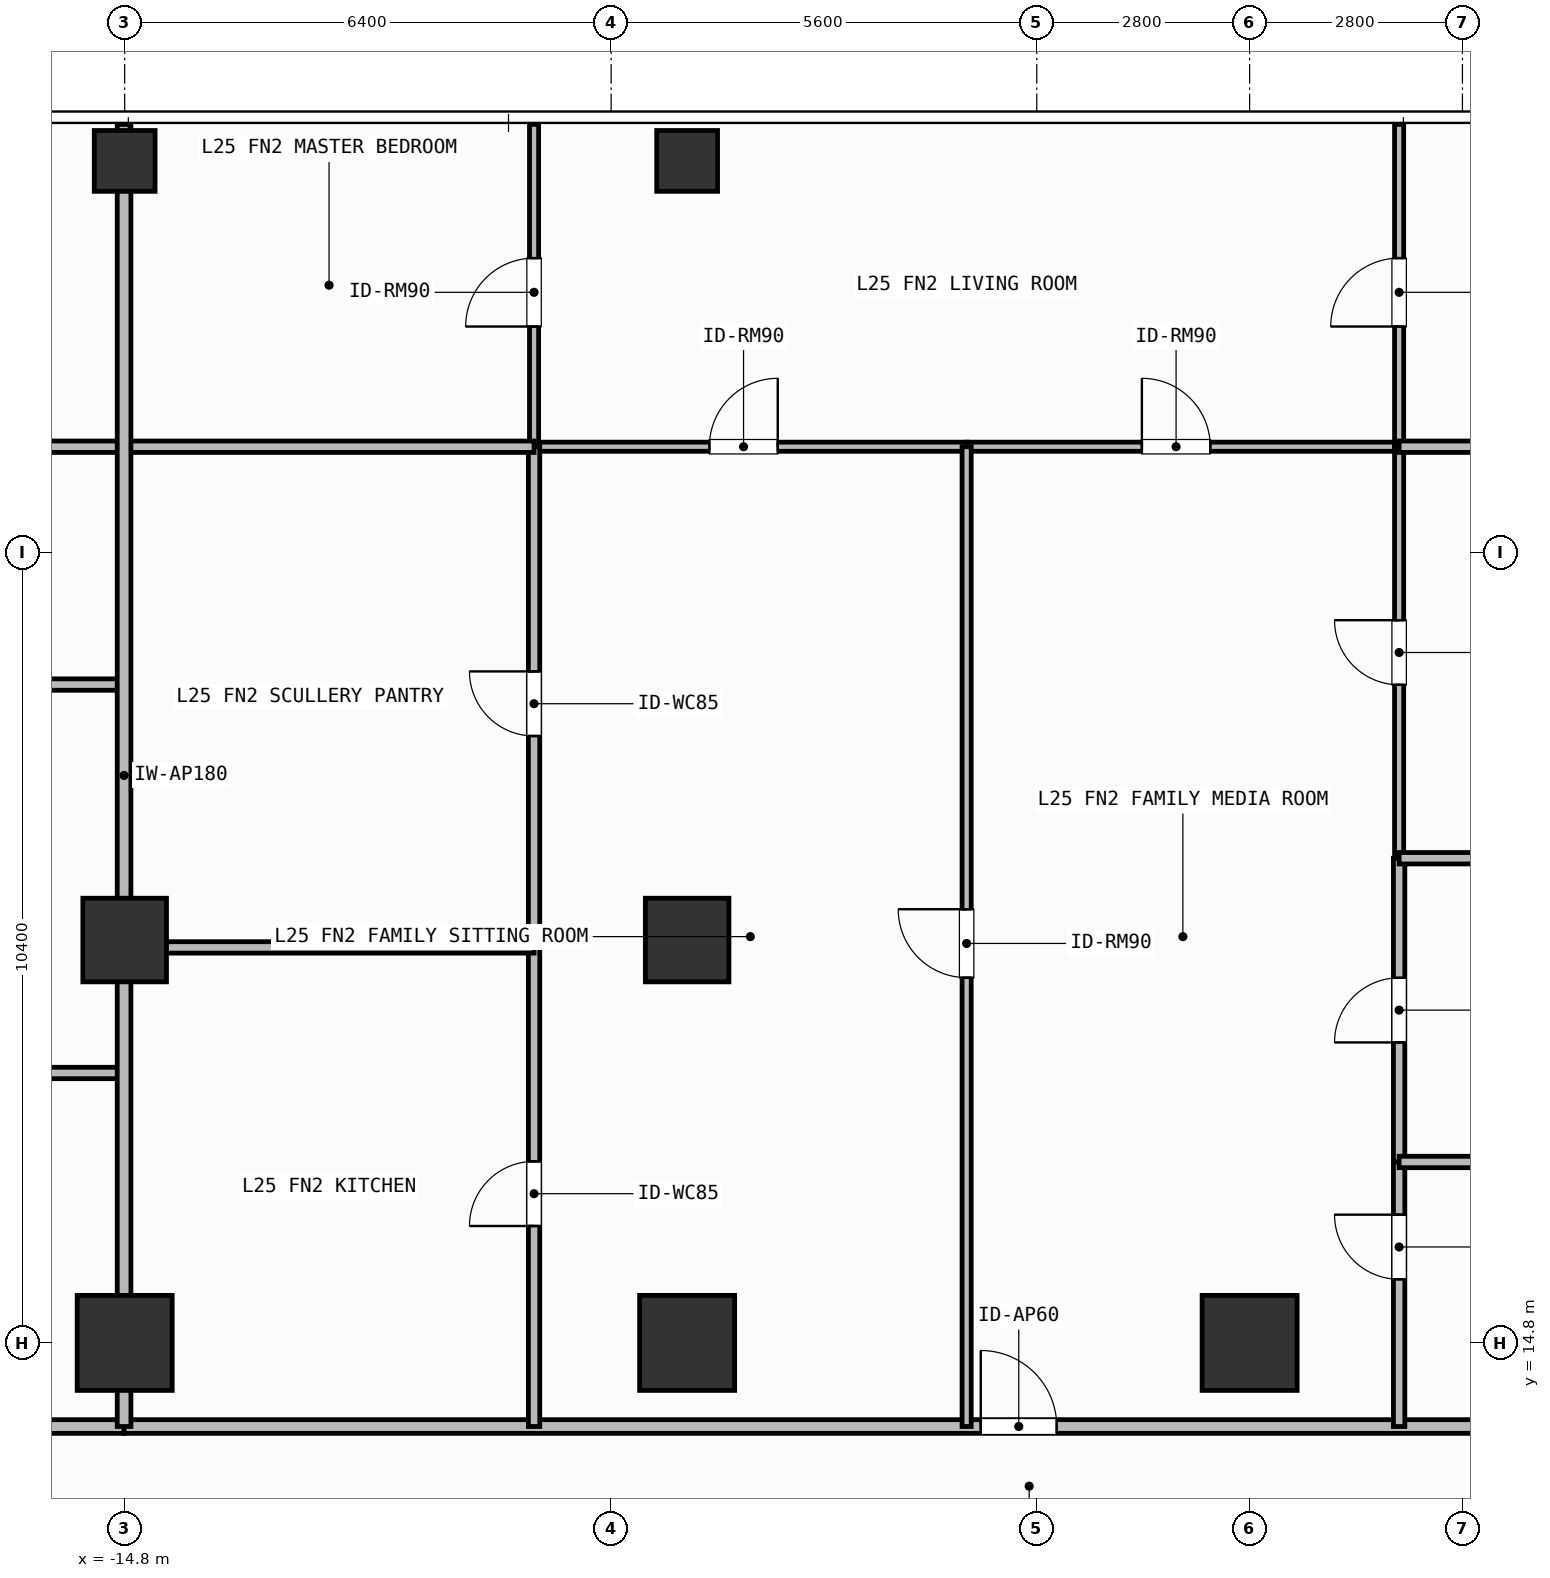
"""IFC4 building model, lengths in metres.
Left out: names, types, materials, properties, quantities, classifications, styles, units other than length and angle.
Written with IfcOpenShell. Run it as: python <this file> out.ifc"""

import sys

from ifc_helpers import new_model, si_unit, direction, frame, frame_2d, origin, origin_2d, place, context, subcontext, project, spatial, rectangle, hollow_rectangle, extrude, element, fill, save


model = new_model("IFC4")
c1 = context("Model", 3, precision=1e-05, world=origin(), true_north=direction((0.0, 1.0)))
c2 = subcontext(c1, "Body", "Model", "MODEL_VIEW")
j1 = project(units=[si_unit("LENGTHUNIT", "METRE"), si_unit("PLANEANGLEUNIT", "RADIAN")], contexts=[c1])
p1 = place(None, origin())
s1 = spatial("IfcSite", under=j1, at=p1, CompositionType="ELEMENT")
p2 = place(p1, origin())
s2 = spatial("IfcBuilding", under=s1, at=p2, CompositionType="ELEMENT")
p3 = place(p2, frame((0.0, 0.0, 100.8)))
s3 = spatial("IfcBuildingStorey", under=s2, at=p3, CompositionType="ELEMENT", Elevation=100.8)
for number, where, z_axis, x_axis in (
    (1, (-14.8, 14.8, 0.0), (0.0, 0.0, 1.0), (1.0, 0.0, 0.0)),
    (2, (-7.4, 14.8, 0.0), (0.0, 0.0, 1.0), (1.0, 0.0, 0.0)),
    (3, (0.0, 14.8, 0.0), (0.0, 0.0, 1.0), (1.0, 0.0, 0.0)),
):
    element("IfcColumn", number, at=place(p3, frame(where, z_axis=z_axis, x_axis=x_axis)), inside=s3, PredefinedType="COLUMN", context=c2, shape_type="SweptSolid", body=[
        extrude(rectangle(XDim=1.25, YDim=1.25, at=origin_2d()), origin(), (0.0, 0.0, 1.0), 3.9),
    ])
for number, where, z_axis, x_axis in (
    (4, (-14.8, 20.1, 0.0), (0.0, 0.0, 1.0), (1.0, 0.0, 0.0)),
    (5, (-7.4, 20.1, 0.0), (0.0, 0.0, 1.0), (1.0, 0.0, 0.0)),
):
    element("IfcColumn", number, at=place(p3, frame(where, z_axis=z_axis, x_axis=x_axis)), inside=s3, PredefinedType="COLUMN", context=c2, shape_type="SweptSolid", body=[
        extrude(rectangle(XDim=1.1, YDim=1.1, at=origin_2d()), origin(), (0.0, 0.0, 1.0), 3.9),
    ])
for number, where, z_axis, x_axis in (
    (6, (-14.8, 30.35, 0.0), (0.0, 0.0, 1.0), (1.0, 0.0, 0.0)),
    (7, (-7.4, 30.35, 0.0), (0.0, 0.0, 1.0), (1.0, 0.0, 0.0)),
):
    element("IfcColumn", number, at=place(p3, frame(where, z_axis=z_axis, x_axis=x_axis)), inside=s3, PredefinedType="COLUMN", context=c2, shape_type="SweptSolid", body=[
        extrude(hollow_rectangle(XDim=0.8, YDim=0.8, WallThickness=0.036, at=origin_2d()), origin(), (0.0, 0.0, 1.0), 3.9),
    ])
p4 = place(p3, frame((-24.42, 13.7, 0.0), z_axis=(0.0, 0.0, 1.0), x_axis=(1.0, 0.0, 0.0)))
e8 = element("IfcWall", 8, at=p4, inside=s3, PredefinedType="PARTITIONING", context=c2, shape_type="SweptSolid", body=[
    extrude(rectangle(XDim=9.612, YDim=0.18, at=frame_2d((4.806, 0.0))), origin(), (0.0, 0.0, 1.0), 3.68),
])
p5 = place(p4, frame((1.748, 0.0, 0.0)))
e9 = element("IfcOpeningElement", 9, at=p5, cuts=e8, PredefinedType="OPENING", context=c2, shape_type="SweptSolid", body=[
    extrude(rectangle(XDim=1.0, YDim=2.2, at=frame_2d((0.5, 1.1))), frame((0.0, 0.1, 0.0), z_axis=(0.0, -1.0, 0.0), x_axis=(1.0, 0.0, 0.0)), (0.0, 0.0, 1.0), 0.2),
])
p6 = place(p3, frame((-14.808, 13.7, 0.0), z_axis=(0.0, 0.0, 1.0), x_axis=(1.0, 0.0, 0.0)))
e10 = element("IfcWall", 10, at=p6, inside=s3, PredefinedType="PARTITIONING", context=c2, shape_type="SweptSolid", body=[
    extrude(rectangle(XDim=21.212, YDim=0.18, at=frame_2d((10.606, 0.0))), origin(), (0.0, 0.0, 1.0), 3.68),
])
p7 = place(p6, frame((11.271, 0.0, 0.0)))
e11 = element("IfcOpeningElement", 11, at=p7, cuts=e10, PredefinedType="OPENING", context=c2, shape_type="SweptSolid", body=[
    extrude(rectangle(XDim=1.0, YDim=2.2, at=frame_2d((0.5, 1.1))), frame((0.0, 0.1, 0.0), z_axis=(0.0, -1.0, 0.0), x_axis=(1.0, 0.0, 0.0)), (0.0, 0.0, 1.0), 0.2),
])
p8 = place(p3, frame((-9.414, 26.59, 0.0), z_axis=(0.0, 0.0, 1.0), x_axis=(1.0, 0.0, 0.0)))
e12 = element("IfcWall", 12, at=p8, inside=s3, PredefinedType="PARTITIONING", context=c2, shape_type="SweptSolid", body=[
    extrude(rectangle(XDim=5.691, YDim=0.12, at=frame_2d((2.846, 0.0))), origin(), (0.0, 0.0, 1.0), 3.68),
])
p9 = place(p8, frame((2.306, 0.0, 0.0)))
e13 = element("IfcOpeningElement", 13, at=p9, cuts=e12, PredefinedType="OPENING", context=c2, shape_type="SweptSolid", body=[
    extrude(rectangle(XDim=0.9, YDim=2.1, at=frame_2d((0.45, 1.05))), frame((0.0, 0.07, 0.0), z_axis=(0.0, -1.0, 0.0), x_axis=(1.0, 0.0, 0.0)), (0.0, 0.0, 1.0), 0.14),
])
p10 = place(p3, frame((-3.723, 26.59, 0.0), z_axis=(0.0, 0.0, 1.0), x_axis=(1.0, 0.0, 0.0)))
e14 = element("IfcWall", 14, at=p10, inside=s3, PredefinedType="PARTITIONING", context=c2, shape_type="SweptSolid", body=[
    extrude(rectangle(XDim=5.69, YDim=0.12, at=frame_2d((2.845, 0.0))), origin(), (0.0, 0.0, 1.0), 3.68),
])
p11 = place(p10, frame((2.306, 0.0, 0.0)))
e15 = element("IfcOpeningElement", 15, at=p11, cuts=e14, PredefinedType="OPENING", context=c2, shape_type="SweptSolid", body=[
    extrude(rectangle(XDim=0.9, YDim=2.1, at=frame_2d((0.45, 1.05))), frame((0.0, 0.07, 0.0), z_axis=(0.0, -1.0, 0.0), x_axis=(1.0, 0.0, 0.0)), (0.0, 0.0, 1.0), 0.14),
])
p12 = place(p3, frame((-3.723, 13.7, 0.0), z_axis=(0.0, 0.0, 1.0), x_axis=(0.0, 1.0, 0.0)))
e16 = element("IfcWall", 16, at=p12, inside=s3, PredefinedType="PARTITIONING", context=c2, shape_type="SweptSolid", body=[
    extrude(rectangle(XDim=12.89, YDim=0.12, at=frame_2d((6.445, 0.0))), origin(), (0.0, 0.0, 1.0), 3.68),
])
p13 = place(p12, frame((5.905, 0.0, 0.0)))
e17 = element("IfcOpeningElement", 17, at=p13, cuts=e16, PredefinedType="OPENING", context=c2, shape_type="SweptSolid", body=[
    extrude(rectangle(XDim=0.9, YDim=2.1, at=frame_2d((0.45, 1.05))), frame((0.0, 0.07, 0.0), z_axis=(0.0, -1.0, 0.0), x_axis=(1.0, 0.0, 0.0)), (0.0, 0.0, 1.0), 0.14),
])
p14 = place(p3, frame((-9.414, 13.7, 0.0), z_axis=(0.0, 0.0, 1.0), x_axis=(0.0, 1.0, 0.0)))
e18 = element("IfcWall", 18, at=p14, inside=s3, PredefinedType="PARTITIONING", context=c2, shape_type="SweptSolid", body=[
    extrude(rectangle(XDim=6.303, YDim=0.15, at=frame_2d((3.151, 0.0))), origin(), (0.0, 0.0, 1.0), 3.68),
])
p15 = place(p14, frame((2.638, 0.0, 0.0)))
e19 = element("IfcOpeningElement", 19, at=p15, cuts=e18, PredefinedType="OPENING", context=c2, shape_type="SweptSolid", body=[
    extrude(rectangle(XDim=0.85, YDim=2.1, at=frame_2d((0.425, 1.05))), frame((0.0, 0.085, 0.0), z_axis=(0.0, -1.0, 0.0), x_axis=(1.0, 0.0, 0.0)), (0.0, 0.0, 1.0), 0.17),
])
p16 = place(p3, frame((-9.414, 20.003, 0.0), z_axis=(0.0, 0.0, 1.0), x_axis=(0.0, 1.0, 0.0)))
e20 = element("IfcWall", 20, at=p16, inside=s3, PredefinedType="PARTITIONING", context=c2, shape_type="SweptSolid", body=[
    extrude(rectangle(XDim=6.587, YDim=0.15, at=frame_2d((3.293, 0.0))), origin(), (0.0, 0.0, 1.0), 3.68),
])
p17 = place(p16, frame((2.781, 0.0, 0.0)))
e21 = element("IfcOpeningElement", 21, at=p17, cuts=e20, PredefinedType="OPENING", context=c2, shape_type="SweptSolid", body=[
    extrude(rectangle(XDim=0.85, YDim=2.1, at=frame_2d((0.425, 1.05))), frame((0.0, 0.085, 0.0), z_axis=(0.0, -1.0, 0.0), x_axis=(1.0, 0.0, 0.0)), (0.0, 0.0, 1.0), 0.17),
])
p18 = place(p3, frame((-9.414, 26.59, 0.0), z_axis=(0.0, 0.0, 1.0), x_axis=(0.0, 1.0, 0.0)))
e22 = element("IfcWall", 22, at=p18, inside=s3, PredefinedType="PARTITIONING", context=c2, shape_type="SweptSolid", body=[
    extrude(rectangle(XDim=4.24, YDim=0.12, at=frame_2d((2.12, 0.0))), origin(), (0.0, 0.0, 1.0), 3.68),
])
p19 = place(p18, frame((1.581, 0.0, 0.0)))
e23 = element("IfcOpeningElement", 23, at=p19, cuts=e22, PredefinedType="OPENING", context=c2, shape_type="SweptSolid", body=[
    extrude(rectangle(XDim=0.9, YDim=2.1, at=frame_2d((0.45, 1.05))), frame((0.0, 0.07, 0.0), z_axis=(0.0, -1.0, 0.0), x_axis=(1.0, 0.0, 0.0)), (0.0, 0.0, 1.0), 0.14),
])
p20 = place(p3, frame((1.967, 13.7, 0.0), z_axis=(0.0, 0.0, 1.0), x_axis=(0.0, 1.0, 0.0)))
e24 = element("IfcWall", 24, at=p20, inside=s3, PredefinedType="PARTITIONING", context=c2, shape_type="SweptSolid", body=[
    extrude(rectangle(XDim=3.48, YDim=0.15, at=frame_2d((1.74, 0.0))), origin(), (0.0, 0.0, 1.0), 3.68),
])
p21 = place(p20, frame((1.937, 0.0, 0.0)))
e25 = element("IfcOpeningElement", 25, at=p21, cuts=e24, PredefinedType="OPENING", context=c2, shape_type="SweptSolid", body=[
    extrude(rectangle(XDim=0.85, YDim=2.1, at=frame_2d((0.425, 1.05))), frame((0.0, 0.085, 0.0), z_axis=(0.0, -1.0, 0.0), x_axis=(1.0, 0.0, 0.0)), (0.0, 0.0, 1.0), 0.17),
])
p22 = place(p3, frame((1.967, 17.18, 0.0), z_axis=(0.0, 0.0, 1.0), x_axis=(0.0, 1.0, 0.0)))
e26 = element("IfcWall", 26, at=p22, inside=s3, PredefinedType="PARTITIONING", context=c2, shape_type="SweptSolid", body=[
    extrude(rectangle(XDim=3.996, YDim=0.15, at=frame_2d((1.998, 0.0))), origin(), (0.0, 0.0, 1.0), 3.68),
])
p23 = place(p22, frame((1.573, 0.0, 0.0)))
e27 = element("IfcOpeningElement", 27, at=p23, cuts=e26, PredefinedType="OPENING", context=c2, shape_type="SweptSolid", body=[
    extrude(rectangle(XDim=0.85, YDim=2.1, at=frame_2d((0.425, 1.05))), frame((0.0, 0.085, 0.0), z_axis=(0.0, -1.0, 0.0), x_axis=(1.0, 0.0, 0.0)), (0.0, 0.0, 1.0), 0.17),
])
p24 = place(p3, frame((1.967, 21.176, 0.0), z_axis=(0.0, 0.0, 1.0), x_axis=(0.0, 1.0, 0.0)))
e28 = element("IfcWall", 28, at=p24, inside=s3, PredefinedType="PARTITIONING", context=c2, shape_type="SweptSolid", body=[
    extrude(rectangle(XDim=5.414, YDim=0.12, at=frame_2d((2.707, 0.0))), origin(), (0.0, 0.0, 1.0), 3.68),
])
p25 = place(p24, frame((2.282, 0.0, 0.0)))
e29 = element("IfcOpeningElement", 29, at=p25, cuts=e28, PredefinedType="OPENING", context=c2, shape_type="SweptSolid", body=[
    extrude(rectangle(XDim=0.85, YDim=2.1, at=frame_2d((0.425, 1.05))), frame((0.0, 0.07, 0.0), z_axis=(0.0, -1.0, 0.0), x_axis=(1.0, 0.0, 0.0)), (0.0, 0.0, 1.0), 0.14),
])
p26 = place(p3, frame((1.967, 26.59, 0.0), z_axis=(0.0, 0.0, 1.0), x_axis=(0.0, 1.0, 0.0)))
e30 = element("IfcWall", 30, at=p26, inside=s3, PredefinedType="PARTITIONING", context=c2, shape_type="SweptSolid", body=[
    extrude(rectangle(XDim=4.24, YDim=0.12, at=frame_2d((2.12, 0.0))), origin(), (0.0, 0.0, 1.0), 3.68),
])
p27 = place(p26, frame((1.581, 0.0, 0.0)))
e31 = element("IfcOpeningElement", 31, at=p27, cuts=e30, PredefinedType="OPENING", context=c2, shape_type="SweptSolid", body=[
    extrude(rectangle(XDim=0.9, YDim=2.1, at=frame_2d((0.45, 1.05))), frame((0.0, 0.07, 0.0), z_axis=(0.0, -1.0, 0.0), x_axis=(1.0, 0.0, 0.0)), (0.0, 0.0, 1.0), 0.14),
])
for number, where, z_axis, x_axis in (
    (32, (-20.721, 18.351, 0.0), (0.0, 0.0, 1.0), (1.0, 0.0, 0.0)),
    (33, (-20.721, 23.461, 0.0), (0.0, 0.0, 1.0), (1.0, 0.0, 0.0)),
    (34, (-20.721, 26.59, 0.0), (0.0, 0.0, 1.0), (1.0, 0.0, 0.0)),
):
    element("IfcWall", number, at=place(p3, frame(where, z_axis=z_axis, x_axis=x_axis)), inside=s3, PredefinedType="PARTITIONING", context=c2, shape_type="SweptSolid", body=[
        extrude(rectangle(XDim=5.913, YDim=0.15, at=frame_2d((2.957, 0.0))), origin(), (0.0, 0.0, 1.0), 3.68),
    ])
p28 = place(p3, frame((-14.808, 20.003, 0.0), z_axis=(0.0, 0.0, 1.0), x_axis=(1.0, 0.0, 0.0)))
e35 = element("IfcWall", 35, at=p28, inside=s3, PredefinedType="PARTITIONING", context=c2, shape_type="SweptSolid", body=[
    extrude(rectangle(XDim=5.394, YDim=0.15, at=frame_2d((2.697, 0.0))), origin(), (0.0, 0.0, 1.0), 3.082),
])
p29 = place(p3, frame((-14.808, 26.59, 0.0), z_axis=(0.0, 0.0, 1.0), x_axis=(1.0, 0.0, 0.0)))
e36 = element("IfcWall", 36, at=p29, inside=s3, PredefinedType="PARTITIONING", context=c2, shape_type="SweptSolid", body=[
    extrude(rectangle(XDim=5.394, YDim=0.15, at=frame_2d((2.697, 0.0))), origin(), (0.0, 0.0, 1.0), 3.68),
])
for number, where, z_axis, x_axis in (
    (37, (1.967, 17.18, 0.0), (0.0, 0.0, 1.0), (1.0, 0.0, 0.0)),
    (38, (1.967, 21.176, 0.0), (0.0, 0.0, 1.0), (1.0, 0.0, 0.0)),
    (39, (1.967, 26.59, 0.0), (0.0, 0.0, 1.0), (1.0, 0.0, 0.0)),
):
    element("IfcWall", number, at=place(p3, frame(where, z_axis=z_axis, x_axis=x_axis)), inside=s3, PredefinedType="PARTITIONING", context=c2, shape_type="SweptSolid", body=[
        extrude(rectangle(XDim=4.437, YDim=0.15, at=frame_2d((2.219, 0.0))), origin(), (0.0, 0.0, 1.0), 3.68),
    ])
p30 = place(p3, frame((-14.808, 13.7, 0.0), z_axis=(0.0, 0.0, 1.0), x_axis=(0.0, 1.0, 0.0)))
e40 = element("IfcWall", 40, at=p30, inside=s3, PredefinedType="PARTITIONING", context=c2, shape_type="SweptSolid", body=[
    extrude(rectangle(XDim=17.13, YDim=0.18, at=frame_2d((8.565, 0.0))), origin(), (0.0, 0.0, 1.0), 3.082),
])
p31 = place(p7, origin())
e41 = element("IfcDoor", 41, at=p31, inside=s3, OperationType="SINGLE_SWING_LEFT", PredefinedType="DOOR", context=c2, shape_type="SweptSolid", body=[
    extrude(rectangle(XDim=1.0, YDim=2.2, at=frame_2d((0.5, 1.1))), frame((0.0, 0.025, 0.0), z_axis=(0.0, -1.0, 0.0), x_axis=(1.0, 0.0, 0.0)), (0.0, 0.0, 1.0), 0.05),
])
fill(e11, e41)
p32 = place(p9, origin())
e42 = element("IfcDoor", 42, at=p32, inside=s3, OperationType="SINGLE_SWING_RIGHT", PredefinedType="DOOR", context=c2, shape_type="SweptSolid", body=[
    extrude(rectangle(XDim=0.9, YDim=2.1, at=frame_2d((0.45, 1.05))), frame((0.0, 0.025, 0.0), z_axis=(0.0, -1.0, 0.0), x_axis=(1.0, 0.0, 0.0)), (0.0, 0.0, 1.0), 0.05),
])
fill(e13, e42)
p33 = place(p11, origin())
e43 = element("IfcDoor", 43, at=p33, inside=s3, OperationType="SINGLE_SWING_LEFT", PredefinedType="DOOR", context=c2, shape_type="SweptSolid", body=[
    extrude(rectangle(XDim=0.9, YDim=2.1, at=frame_2d((0.45, 1.05))), frame((0.0, 0.025, 0.0), z_axis=(0.0, -1.0, 0.0), x_axis=(1.0, 0.0, 0.0)), (0.0, 0.0, 1.0), 0.05),
])
fill(e15, e43)
p34 = place(p13, origin())
e44 = element("IfcDoor", 44, at=p34, inside=s3, OperationType="SINGLE_SWING_RIGHT", PredefinedType="DOOR", context=c2, shape_type="SweptSolid", body=[
    extrude(rectangle(XDim=0.9, YDim=2.1, at=frame_2d((0.45, 1.05))), frame((0.0, 0.025, 0.0), z_axis=(0.0, -1.0, 0.0), x_axis=(1.0, 0.0, 0.0)), (0.0, 0.0, 1.0), 0.05),
])
fill(e17, e44)
p35 = place(p15, origin())
e45 = element("IfcDoor", 45, at=p35, inside=s3, OperationType="SINGLE_SWING_LEFT", PredefinedType="DOOR", context=c2, shape_type="SweptSolid", body=[
    extrude(rectangle(XDim=0.85, YDim=2.1, at=frame_2d((0.425, 1.05))), frame((0.0, 0.025, 0.0), z_axis=(0.0, -1.0, 0.0), x_axis=(1.0, 0.0, 0.0)), (0.0, 0.0, 1.0), 0.05),
])
fill(e19, e45)
p36 = place(p17, origin())
e46 = element("IfcDoor", 46, at=p36, inside=s3, OperationType="SINGLE_SWING_RIGHT", PredefinedType="DOOR", context=c2, shape_type="SweptSolid", body=[
    extrude(rectangle(XDim=0.85, YDim=2.1, at=frame_2d((0.425, 1.05))), frame((0.0, 0.025, 0.0), z_axis=(0.0, -1.0, 0.0), x_axis=(1.0, 0.0, 0.0)), (0.0, 0.0, 1.0), 0.05),
])
fill(e21, e46)
p37 = place(p19, origin())
e47 = element("IfcDoor", 47, at=p37, inside=s3, OperationType="SINGLE_SWING_LEFT", PredefinedType="DOOR", context=c2, shape_type="SweptSolid", body=[
    extrude(rectangle(XDim=0.9, YDim=2.1, at=frame_2d((0.45, 1.05))), frame((0.0, 0.025, 0.0), z_axis=(0.0, -1.0, 0.0), x_axis=(1.0, 0.0, 0.0)), (0.0, 0.0, 1.0), 0.05),
])
fill(e23, e47)
p38 = place(p21, origin())
e48 = element("IfcDoor", 48, at=p38, inside=s3, OperationType="SINGLE_SWING_RIGHT", PredefinedType="DOOR", context=c2, shape_type="SweptSolid", body=[
    extrude(rectangle(XDim=0.85, YDim=2.1, at=frame_2d((0.425, 1.05))), frame((0.0, 0.025, 0.0), z_axis=(0.0, -1.0, 0.0), x_axis=(1.0, 0.0, 0.0)), (0.0, 0.0, 1.0), 0.05),
])
fill(e25, e48)
p39 = place(p23, origin())
e49 = element("IfcDoor", 49, at=p39, inside=s3, OperationType="SINGLE_SWING_LEFT", PredefinedType="DOOR", context=c2, shape_type="SweptSolid", body=[
    extrude(rectangle(XDim=0.85, YDim=2.1, at=frame_2d((0.425, 1.05))), frame((0.0, 0.025, 0.0), z_axis=(0.0, -1.0, 0.0), x_axis=(1.0, 0.0, 0.0)), (0.0, 0.0, 1.0), 0.05),
])
fill(e27, e49)
p40 = place(p25, origin())
e50 = element("IfcDoor", 50, at=p40, inside=s3, OperationType="SINGLE_SWING_RIGHT", PredefinedType="DOOR", context=c2, shape_type="SweptSolid", body=[
    extrude(rectangle(XDim=0.85, YDim=2.1, at=frame_2d((0.425, 1.05))), frame((0.0, 0.025, 0.0), z_axis=(0.0, -1.0, 0.0), x_axis=(1.0, 0.0, 0.0)), (0.0, 0.0, 1.0), 0.05),
])
fill(e29, e50)
p41 = place(p27, origin())
e51 = element("IfcDoor", 51, at=p41, inside=s3, OperationType="SINGLE_SWING_LEFT", PredefinedType="DOOR", context=c2, shape_type="SweptSolid", body=[
    extrude(rectangle(XDim=0.9, YDim=2.1, at=frame_2d((0.45, 1.05))), frame((0.0, 0.025, 0.0), z_axis=(0.0, -1.0, 0.0), x_axis=(1.0, 0.0, 0.0)), (0.0, 0.0, 1.0), 0.05),
])
fill(e31, e51)
save(model, sys.argv[1])
